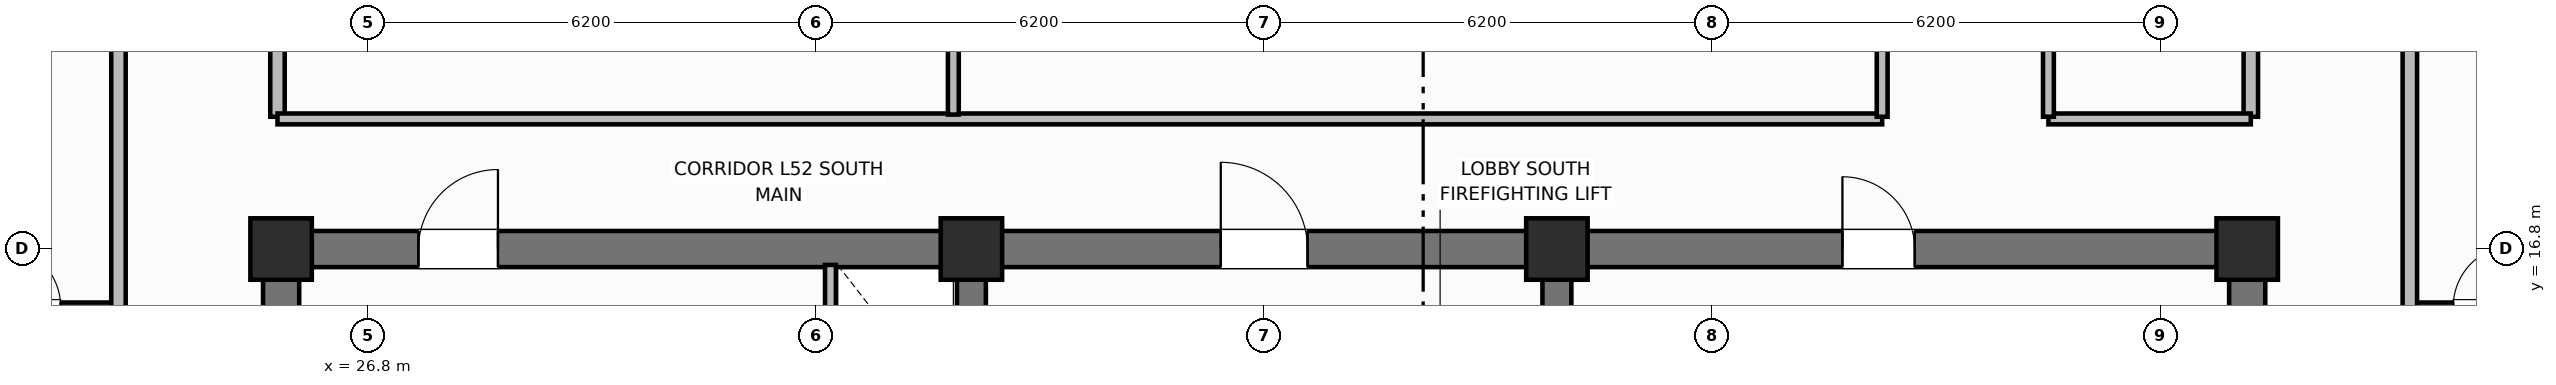
"""IFC4 building model, lengths in metres.
Left out: names, types, materials, properties, quantities, classifications, styles, units other than length and angle.
Written with IfcOpenShell. Run it as: python <this file> out.ifc"""

import sys

from ifc_helpers import new_model, si_unit, direction, frame, frame_2d, origin, origin_2d, place, context, subcontext, project, spatial, rectangle, extrude, element, fill, save


model = new_model("IFC4")
c1 = context("Model", 3, precision=1e-05, world=origin(), true_north=direction((0.0, 1.0)))
c2 = subcontext(c1, "Body", "Model", "MODEL_VIEW")
j1 = project(units=[si_unit("LENGTHUNIT", "METRE"), si_unit("PLANEANGLEUNIT", "RADIAN")], contexts=[c1])
p1 = place(None, origin())
s1 = spatial("IfcSite", under=j1, at=p1, CompositionType="ELEMENT")
p2 = place(p1, origin())
s2 = spatial("IfcBuilding", under=s1, at=p2, CompositionType="ELEMENT")
p3 = place(p2, frame((0.0, 0.0, 211.0)))
s3 = spatial("IfcBuildingStorey", under=s2, at=p3, CompositionType="ELEMENT", Elevation=211.0)
for number, where, z_axis, x_axis in (
    (1, (25.6, 10.85, 0.0), (0.0, 0.0, 1.0), (0.0, 1.0, 0.0)),
    (2, (52.8, 10.85, 0.0), (0.0, 0.0, 1.0), (0.0, 1.0, 0.0)),
):
    element("IfcWall", number, at=place(p3, frame(where, z_axis=z_axis, x_axis=x_axis)), inside=s3, PredefinedType="SHEAR", context=c2, shape_type="SweptSolid", body=[
        extrude(rectangle(XDim=5.7, YDim=0.5, at=frame_2d((2.85, 0.0))), origin(), (0.0, 0.0, 1.0), 3.7),
    ])
p4 = place(p3, frame((25.6, 16.8, 0.0), z_axis=(0.0, 0.0, 1.0), x_axis=(1.0, 0.0, 0.0)))
e3 = element("IfcWall", 3, at=p4, inside=s3, PredefinedType="SHEAR", context=c2, shape_type="SweptSolid", body=[
    extrude(rectangle(XDim=27.2, YDim=0.5, at=frame_2d((13.6, 0.0))), origin(), (0.0, 0.0, 1.0), 3.7),
])
p5 = place(p4, frame((1.9, 0.0, 0.0)))
e4 = element("IfcOpeningElement", 4, at=p5, cuts=e3, PredefinedType="OPENING", context=c2, shape_type="SweptSolid", body=[
    extrude(rectangle(XDim=1.1, YDim=2.15, at=frame_2d((0.55, 1.075))), frame((0.0, 0.26, 0.0), z_axis=(0.0, -1.0, 0.0), x_axis=(1.0, 0.0, 0.0)), (0.0, 0.0, 1.0), 0.52),
])
p6 = place(p4, frame((13.0, 0.0, 0.0)))
e5 = element("IfcOpeningElement", 5, at=p6, cuts=e3, PredefinedType="OPENING", context=c2, shape_type="SweptSolid", body=[
    extrude(rectangle(XDim=1.2, YDim=2.15, at=frame_2d((0.6, 1.075))), frame((0.0, 0.26, 0.0), z_axis=(0.0, -1.0, 0.0), x_axis=(1.0, 0.0, 0.0)), (0.0, 0.0, 1.0), 0.52),
])
p7 = place(p4, frame((21.6, 0.0, 0.0)))
e6 = element("IfcOpeningElement", 6, at=p7, cuts=e3, PredefinedType="OPENING", context=c2, shape_type="SweptSolid", body=[
    extrude(rectangle(XDim=1.0, YDim=2.15, at=frame_2d((0.5, 1.075))), frame((0.0, 0.26, 0.0), z_axis=(0.0, -1.0, 0.0), x_axis=(1.0, 0.0, 0.0)), (0.0, 0.0, 1.0), 0.52),
])
for number, where, z_axis, x_axis in (
    (7, (35.15, 10.85, 0.0), (0.0, 0.0, 1.0), (0.0, 1.0, 0.0)),
    (8, (43.25, 10.85, 0.0), (0.0, 0.0, 1.0), (0.0, 1.0, 0.0)),
):
    element("IfcWall", number, at=place(p3, frame(where, z_axis=z_axis, x_axis=x_axis)), inside=s3, PredefinedType="SHEAR", context=c2, shape_type="SweptSolid", body=[
        extrude(rectangle(XDim=5.7, YDim=0.4, at=frame_2d((2.85, 0.0))), origin(), (0.0, 0.0, 1.0), 3.7),
    ])
for number, where, z_axis, x_axis in (
    (9, (25.6, 16.8, 0.0), (0.0, 0.0, 1.0), (1.0, 0.0, 0.0)),
    (10, (35.15, 16.8, 0.0), (0.0, 0.0, 1.0), (1.0, 0.0, 0.0)),
    (11, (43.25, 16.8, 0.0), (0.0, 0.0, 1.0), (1.0, 0.0, 0.0)),
    (12, (52.8, 16.8, 0.0), (0.0, 0.0, 1.0), (1.0, 0.0, 0.0)),
):
    element("IfcColumn", number, at=place(p3, frame(where, z_axis=z_axis, x_axis=x_axis)), inside=s3, PredefinedType="COLUMN", context=c2, shape_type="SweptSolid", body=[
        extrude(rectangle(XDim=0.85, YDim=0.85, at=origin_2d()), origin(), (0.0, 0.0, 1.0), 3.7),
    ])
p8 = place(p3, frame((33.2, 14.5, 0.0), z_axis=(0.0, 0.0, 1.0), x_axis=(0.0, 1.0, 0.0)))
e13 = element("IfcWall", 13, at=p8, inside=s3, PredefinedType="PARTITIONING", context=c2, shape_type="SweptSolid", body=[
    extrude(rectangle(XDim=2.08, YDim=0.15, at=frame_2d((1.04, 0.0))), origin(), (0.0, 0.0, 1.0), 2.55),
])
p9 = place(p8, frame((0.55, 0.0, 0.0)))
e14 = element("IfcOpeningElement", 14, at=p9, cuts=e13, PredefinedType="OPENING", context=c2, shape_type="SweptSolid", body=[
    extrude(rectangle(XDim=0.85, YDim=2.05, at=frame_2d((0.425, 1.025))), frame((0.0, 0.085, 0.0), z_axis=(0.0, -1.0, 0.0), x_axis=(1.0, 0.0, 0.0)), (0.0, 0.0, 1.0), 0.17),
])
for number, where, z_axis, x_axis in (
    (15, (25.55, 18.63, 0.0), (0.0, 0.0, 1.0), (0.0, 1.0, 0.0)),
    (16, (52.85, 18.63, 0.0), (0.0, 0.0, 1.0), (0.0, 1.0, 0.0)),
):
    element("IfcWall", number, at=place(p3, frame(where, z_axis=z_axis, x_axis=x_axis)), inside=s3, PredefinedType="PARTITIONING", context=c2, shape_type="SweptSolid", body=[
        extrude(rectangle(XDim=19.14, YDim=0.2, at=frame_2d((9.57, 0.0))), origin(), (0.0, 0.0, 1.0), 2.55),
    ])
p10 = place(p3, frame((25.55, 18.6, 0.0), z_axis=(0.0, 0.0, 1.0), x_axis=(1.0, 0.0, 0.0)))
e17 = element("IfcWall", 17, at=p10, inside=s3, PredefinedType="PARTITIONING", context=c2, shape_type="SweptSolid", body=[
    extrude(rectangle(XDim=22.2, YDim=0.15, at=frame_2d((11.1, 0.0))), origin(), (0.0, 0.0, 1.0), 2.55),
])
p11 = place(p3, frame((50.05, 18.6, 0.0), z_axis=(0.0, 0.0, 1.0), x_axis=(1.0, 0.0, 0.0)))
e18 = element("IfcWall", 18, at=p11, inside=s3, PredefinedType="PARTITIONING", context=c2, shape_type="SweptSolid", body=[
    extrude(rectangle(XDim=2.8, YDim=0.15, at=frame_2d((1.4, 0.0))), origin(), (0.0, 0.0, 1.0), 2.55),
])
p12 = place(p3, frame((34.9, 18.66, 0.0), z_axis=(0.0, 0.0, 1.0), x_axis=(0.0, 1.0, 0.0)))
e19 = element("IfcWall", 19, at=p12, inside=s3, PredefinedType="PARTITIONING", context=c2, shape_type="SweptSolid", body=[
    extrude(rectangle(XDim=19.08, YDim=0.15, at=frame_2d((9.54, 0.0))), origin(), (0.0, 0.0, 1.0), 2.55),
])
p13 = place(p12, frame((5.0, 0.0, 0.0)))
e20 = element("IfcOpeningElement", 20, at=p13, cuts=e19, PredefinedType="OPENING", context=c2, shape_type="SweptSolid", body=[
    extrude(rectangle(XDim=1.0, YDim=2.15, at=frame_2d((0.5, 1.075))), frame((0.0, 0.085, 0.0), z_axis=(0.0, -1.0, 0.0), x_axis=(1.0, 0.0, 0.0)), (0.0, 0.0, 1.0), 0.17),
])
p14 = place(p3, frame((47.75, 18.63, 0.0), z_axis=(0.0, 0.0, 1.0), x_axis=(0.0, 1.0, 0.0)))
e21 = element("IfcWall", 21, at=p14, inside=s3, PredefinedType="PARTITIONING", context=c2, shape_type="SweptSolid", body=[
    extrude(rectangle(XDim=19.14, YDim=0.15, at=frame_2d((9.57, 0.0))), origin(), (0.0, 0.0, 1.0), 2.55),
])
p15 = place(p14, frame((2.4, 0.0, 0.0)))
e22 = element("IfcOpeningElement", 22, at=p15, cuts=e21, PredefinedType="OPENING", context=c2, shape_type="SweptSolid", body=[
    extrude(rectangle(XDim=0.9, YDim=2.1, at=frame_2d((0.45, 1.05))), frame((0.0, 0.085, 0.0), z_axis=(0.0, -1.0, 0.0), x_axis=(1.0, 0.0, 0.0)), (0.0, 0.0, 1.0), 0.17),
])
p16 = place(p14, frame((9.847, 0.0, 0.0)))
e23 = element("IfcOpeningElement", 23, at=p16, cuts=e21, PredefinedType="OPENING", context=c2, shape_type="SweptSolid", body=[
    extrude(rectangle(XDim=0.9, YDim=2.1, at=frame_2d((0.45, 1.05))), frame((0.0, 0.085, 0.0), z_axis=(0.0, -1.0, 0.0), x_axis=(1.0, 0.0, 0.0)), (0.0, 0.0, 1.0), 0.17),
])
p17 = place(p3, frame((50.05, 18.63, 0.0), z_axis=(0.0, 0.0, 1.0), x_axis=(0.0, 1.0, 0.0)))
e24 = element("IfcWall", 24, at=p17, inside=s3, PredefinedType="PARTITIONING", context=c2, shape_type="SweptSolid", body=[
    extrude(rectangle(XDim=19.14, YDim=0.15, at=frame_2d((9.57, 0.0))), origin(), (0.0, 0.0, 1.0), 2.55),
])
p18 = place(p17, frame((2.2, 0.0, 0.0)))
e25 = element("IfcOpeningElement", 25, at=p18, cuts=e24, PredefinedType="OPENING", context=c2, shape_type="SweptSolid", body=[
    extrude(rectangle(XDim=1.0, YDim=2.15, at=frame_2d((0.5, 1.075))), frame((0.0, 0.085, 0.0), z_axis=(0.0, -1.0, 0.0), x_axis=(1.0, 0.0, 0.0)), (0.0, 0.0, 1.0), 0.17),
])
p19 = place(p17, frame((9.847, 0.0, 0.0)))
e26 = element("IfcOpeningElement", 26, at=p19, cuts=e24, PredefinedType="OPENING", context=c2, shape_type="SweptSolid", body=[
    extrude(rectangle(XDim=1.0, YDim=2.15, at=frame_2d((0.5, 1.075))), frame((0.0, 0.085, 0.0), z_axis=(0.0, -1.0, 0.0), x_axis=(1.0, 0.0, 0.0)), (0.0, 0.0, 1.0), 0.17),
])
p20 = place(p3, frame((21.1, 16.0, 0.0), z_axis=(0.0, 0.0, 1.0), x_axis=(1.0, 0.0, 0.0)))
e27 = element("IfcWall", 27, at=p20, inside=s3, PredefinedType="PARTITIONING", context=c2, shape_type="SweptSolid", body=[
    extrude(rectangle(XDim=2.25, YDim=0.12, at=frame_2d((1.125, 0.0))), origin(), (0.0, 0.0, 1.0), 2.55),
])
p21 = place(p20, frame((0.6, 0.0, 0.0)))
e28 = element("IfcOpeningElement", 28, at=p21, cuts=e27, PredefinedType="OPENING", context=c2, shape_type="SweptSolid", body=[
    extrude(rectangle(XDim=0.85, YDim=2.1, at=frame_2d((0.425, 1.05))), frame((0.0, 0.07, 0.0), z_axis=(0.0, -1.0, 0.0), x_axis=(1.0, 0.0, 0.0)), (0.0, 0.0, 1.0), 0.14),
])
p22 = place(p3, frame((23.35, 10.6, 0.0), z_axis=(0.0, 0.0, 1.0), x_axis=(0.0, 1.0, 0.0)))
e29 = element("IfcWall", 29, at=p22, inside=s3, PredefinedType="PARTITIONING", context=c2, shape_type="SweptSolid", body=[
    extrude(rectangle(XDim=35.2, YDim=0.2, at=frame_2d((17.6, 0.0))), origin(), (0.0, 0.0, 1.0), 2.55),
])
p23 = place(p22, frame((2.65, 0.0, 0.0)))
e30 = element("IfcOpeningElement", 30, at=p23, cuts=e29, PredefinedType="OPENING", context=c2, shape_type="SweptSolid", body=[
    extrude(rectangle(XDim=1.0, YDim=2.15, at=frame_2d((0.5, 1.075))), frame((0.0, 0.11, 0.0), z_axis=(0.0, -1.0, 0.0), x_axis=(1.0, 0.0, 0.0)), (0.0, 0.0, 1.0), 0.22),
])
p24 = place(p22, frame((19.79, 0.0, 0.0)))
e31 = element("IfcOpeningElement", 31, at=p24, cuts=e29, PredefinedType="OPENING", context=c2, shape_type="SweptSolid", body=[
    extrude(rectangle(XDim=1.0, YDim=2.15, at=frame_2d((0.5, 1.075))), frame((0.0, 0.11, 0.0), z_axis=(0.0, -1.0, 0.0), x_axis=(1.0, 0.0, 0.0)), (0.0, 0.0, 1.0), 0.22),
])
p25 = place(p3, frame((55.05, 16.0, 0.0), z_axis=(0.0, 0.0, 1.0), x_axis=(1.0, 0.0, 0.0)))
e32 = element("IfcWall", 32, at=p25, inside=s3, PredefinedType="PARTITIONING", context=c2, shape_type="SweptSolid", body=[
    extrude(rectangle(XDim=2.25, YDim=0.12, at=frame_2d((1.125, 0.0))), origin(), (0.0, 0.0, 1.0), 2.55),
])
p26 = place(p25, frame((0.6, 0.0, 0.0)))
e33 = element("IfcOpeningElement", 33, at=p26, cuts=e32, PredefinedType="OPENING", context=c2, shape_type="SweptSolid", body=[
    extrude(rectangle(XDim=0.85, YDim=2.1, at=frame_2d((0.425, 1.05))), frame((0.0, 0.07, 0.0), z_axis=(0.0, -1.0, 0.0), x_axis=(1.0, 0.0, 0.0)), (0.0, 0.0, 1.0), 0.14),
])
p27 = place(p3, frame((55.05, 10.6, 0.0), z_axis=(0.0, 0.0, 1.0), x_axis=(0.0, 1.0, 0.0)))
e34 = element("IfcWall", 34, at=p27, inside=s3, PredefinedType="PARTITIONING", context=c2, shape_type="SweptSolid", body=[
    extrude(rectangle(XDim=35.2, YDim=0.2, at=frame_2d((17.6, 0.0))), origin(), (0.0, 0.0, 1.0), 2.55),
])
p28 = place(p27, frame((2.65, 0.0, 0.0)))
e35 = element("IfcOpeningElement", 35, at=p28, cuts=e34, PredefinedType="OPENING", context=c2, shape_type="SweptSolid", body=[
    extrude(rectangle(XDim=1.0, YDim=2.15, at=frame_2d((0.5, 1.075))), frame((0.0, 0.11, 0.0), z_axis=(0.0, -1.0, 0.0), x_axis=(1.0, 0.0, 0.0)), (0.0, 0.0, 1.0), 0.22),
])
p29 = place(p27, frame((12.166, 0.0, 0.0)))
e36 = element("IfcOpeningElement", 36, at=p29, cuts=e34, PredefinedType="OPENING", context=c2, shape_type="SweptSolid", body=[
    extrude(rectangle(XDim=1.0, YDim=2.15, at=frame_2d((0.5, 1.075))), frame((0.0, 0.11, 0.0), z_axis=(0.0, -1.0, 0.0), x_axis=(1.0, 0.0, 0.0)), (0.0, 0.0, 1.0), 0.22),
])
p30 = place(p27, frame((23.65, 0.0, 0.0)))
e37 = element("IfcOpeningElement", 37, at=p30, cuts=e34, PredefinedType="OPENING", context=c2, shape_type="SweptSolid", body=[
    extrude(rectangle(XDim=1.0, YDim=2.15, at=frame_2d((0.5, 1.075))), frame((0.0, 0.11, 0.0), z_axis=(0.0, -1.0, 0.0), x_axis=(1.0, 0.0, 0.0)), (0.0, 0.0, 1.0), 0.22),
])
p31 = place(p21, origin())
e38 = element("IfcDoor", 38, at=p31, inside=s3, OperationType="SINGLE_SWING_LEFT", PredefinedType="DOOR", context=c2, shape_type="SweptSolid", body=[
    extrude(rectangle(XDim=0.85, YDim=2.1, at=frame_2d((0.425, 1.05))), frame((0.0, 0.025, 0.0), z_axis=(0.0, -1.0, 0.0), x_axis=(1.0, 0.0, 0.0)), (0.0, 0.0, 1.0), 0.05),
])
fill(e28, e38)
p32 = place(p26, origin())
e39 = element("IfcDoor", 39, at=p32, inside=s3, OperationType="SINGLE_SWING_RIGHT", PredefinedType="DOOR", context=c2, shape_type="SweptSolid", body=[
    extrude(rectangle(XDim=0.85, YDim=2.1, at=frame_2d((0.425, 1.05))), frame((0.0, 0.025, 0.0), z_axis=(0.0, -1.0, 0.0), x_axis=(1.0, 0.0, 0.0)), (0.0, 0.0, 1.0), 0.05),
])
fill(e33, e39)
p33 = place(p5, origin())
e40 = element("IfcDoor", 40, at=p33, inside=s3, OperationType="SINGLE_SWING_RIGHT", PredefinedType="DOOR", context=c2, shape_type="SweptSolid", body=[
    extrude(rectangle(XDim=1.1, YDim=2.15, at=frame_2d((0.55, 1.075))), frame((0.0, 0.025, 0.0), z_axis=(0.0, -1.0, 0.0), x_axis=(1.0, 0.0, 0.0)), (0.0, 0.0, 1.0), 0.05),
])
fill(e4, e40)
p34 = place(p6, origin())
e41 = element("IfcDoor", 41, at=p34, inside=s3, OperationType="SINGLE_SWING_LEFT", PredefinedType="DOOR", context=c2, shape_type="SweptSolid", body=[
    extrude(rectangle(XDim=1.2, YDim=2.15, at=frame_2d((0.6, 1.075))), frame((0.0, 0.025, 0.0), z_axis=(0.0, -1.0, 0.0), x_axis=(1.0, 0.0, 0.0)), (0.0, 0.0, 1.0), 0.05),
])
fill(e5, e41)
p35 = place(p7, origin())
e42 = element("IfcDoor", 42, at=p35, inside=s3, OperationType="SINGLE_SWING_LEFT", PredefinedType="DOOR", context=c2, shape_type="SweptSolid", body=[
    extrude(rectangle(XDim=1.0, YDim=2.15, at=frame_2d((0.5, 1.075))), frame((0.0, 0.025, 0.0), z_axis=(0.0, -1.0, 0.0), x_axis=(1.0, 0.0, 0.0)), (0.0, 0.0, 1.0), 0.05),
])
fill(e6, e42)
save(model, sys.argv[1])
